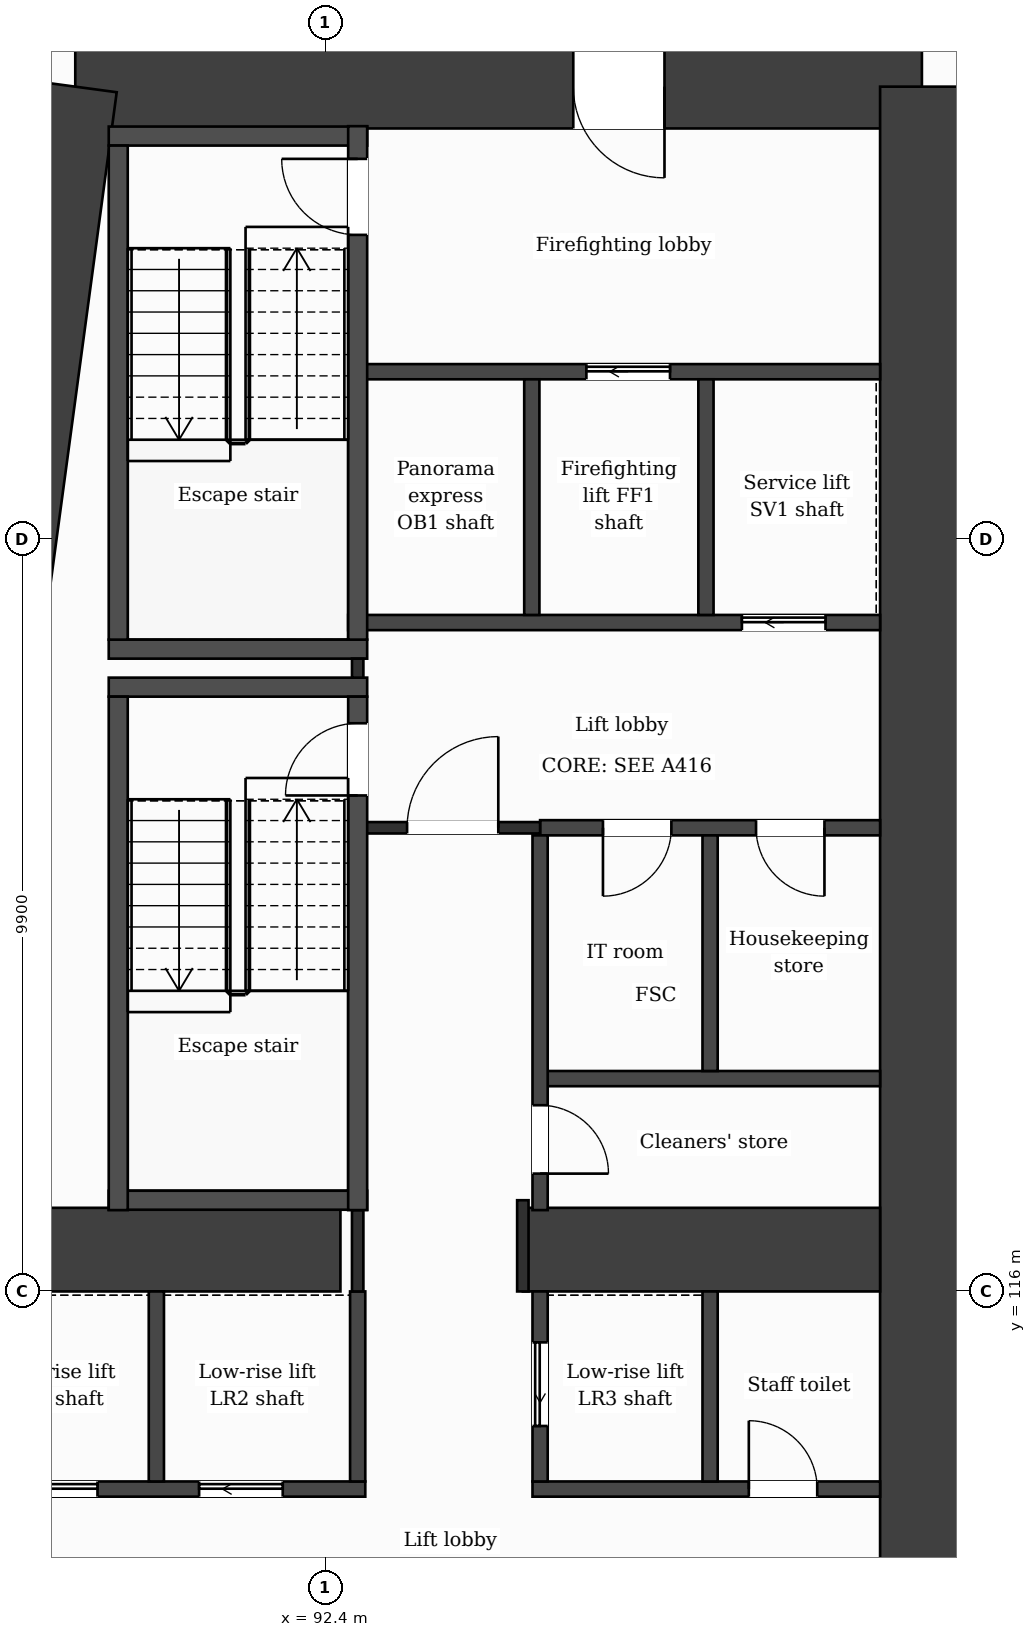
"""IFC4 building model, lengths in metres.
Left out: names, types, materials, properties, quantities, classifications, styles, units other than length and angle.
Written with IfcOpenShell. Run it as: python <this file> out.ifc"""

import sys

from ifc_helpers import new_model, si_unit, direction, frame, frame_2d, origin, place, context, subcontext, project, spatial, rectangle, extrude, element, fill, save


model = new_model("IFC4")
c1 = context("Model", 3, precision=1e-05, world=origin(), true_north=direction((0.0, 1.0)))
c2 = subcontext(c1, "Body", "Model", "MODEL_VIEW")
j1 = project(units=[si_unit("LENGTHUNIT", "METRE"), si_unit("PLANEANGLEUNIT", "RADIAN")], contexts=[c1])
p1 = place(None, origin())
s1 = spatial("IfcSite", under=j1, at=p1, CompositionType="ELEMENT")
p2 = place(p1, origin())
s2 = spatial("IfcBuilding", under=s1, at=p2, CompositionType="ELEMENT")
p3 = place(p2, frame((0.0, 0.0, 70.5)))
s3 = spatial("IfcBuildingStorey", under=s2, at=p3, CompositionType="ELEMENT", Elevation=70.5)
p4 = place(p3, frame((89.112, 131.85, 0.0), z_axis=(0.0, 0.0, 1.0), x_axis=(1.0, 0.0, 0.0)))
e1 = element("IfcWall", 1, at=p4, inside=s3, PredefinedType="SHEAR", context=c2, shape_type="SweptSolid", body=[
    extrude(rectangle(XDim=11.138, YDim=1.1, at=frame_2d((5.569, 0.0))), origin(), (0.0, 0.0, 1.0), 3.5),
])
p5 = place(p4, frame((6.552, 0.0, 0.0)))
e2 = element("IfcOpeningElement", 2, at=p5, cuts=e1, PredefinedType="OPENING", context=c2, shape_type="SweptSolid", body=[
    extrude(rectangle(XDim=1.2, YDim=2.1, at=frame_2d((0.6, 1.05))), frame((0.0, 0.56, 0.0), z_axis=(0.0, -1.0, 0.0), x_axis=(1.0, 0.0, 0.0)), (0.0, 0.0, 1.0), 1.12),
])
p6 = place(p3, frame((100.25, 131.85, 0.0), z_axis=(0.0, 0.0, 1.0), x_axis=(0.0, -1.0, 0.0)))
e3 = element("IfcWall", 3, at=p6, inside=s3, PredefinedType="SHEAR", context=c2, shape_type="SweptSolid", body=[
    extrude(rectangle(XDim=20.9, YDim=1.1, at=frame_2d((10.45, 0.0))), origin(), (0.0, 0.0, 1.0), 3.5),
])
p7 = place(p3, frame((86.298, 110.95, 0.0), z_axis=(0.0, 0.0, 1.0), x_axis=(0.133400422634, 0.99106222168, 0.0)))
e4 = element("IfcWall", 4, at=p7, inside=s3, PredefinedType="SHEAR", context=c2, shape_type="SweptSolid", body=[
    extrude(rectangle(XDim=21.089, YDim=1.1, at=frame_2d((10.544, 0.0))), origin(), (0.0, 0.0, 1.0), 3.5),
])
p8 = place(p3, frame((87.523, 116.55, 0.0), z_axis=(0.0, 0.0, 1.0), x_axis=(1.0, 0.0, 0.0)))
e5 = element("IfcWall", 5, at=p8, inside=s3, PredefinedType="SHEAR", context=c2, shape_type="SweptSolid", body=[
    extrude(rectangle(XDim=5.077, YDim=1.1, at=frame_2d((2.539, 0.0))), origin(), (0.0, 0.0, 1.0), 3.5),
])
p9 = place(p3, frame((95.0, 116.55, 0.0), z_axis=(0.0, 0.0, 1.0), x_axis=(1.0, 0.0, 0.0)))
e6 = element("IfcWall", 6, at=p9, inside=s3, PredefinedType="SHEAR", context=c2, shape_type="SweptSolid", body=[
    extrude(rectangle(XDim=4.7, YDim=1.1, at=frame_2d((2.35, 0.0))), origin(), (0.0, 0.0, 1.0), 3.5),
])
p10 = place(p3, frame((87.153, 113.4, 0.0), z_axis=(0.0, 0.0, 1.0), x_axis=(1.0, 0.0, 0.0)))
e7 = element("IfcWall", 7, at=p10, inside=s3, PredefinedType="PARTITIONING", context=c2, shape_type="SweptSolid", body=[
    extrude(rectangle(XDim=5.774, YDim=0.2, at=frame_2d((2.887, 0.0))), origin(), (0.0, 0.0, 1.0), 3.18),
])
p11 = place(p10, frame((1.151, 0.0, 0.0)))
e8 = element("IfcOpeningElement", 8, at=p11, cuts=e7, PredefinedType="OPENING", context=c2, shape_type="SweptSolid", body=[
    extrude(rectangle(XDim=1.1, YDim=2.1, at=frame_2d((0.55, 1.05))), frame((0.0, 0.11, 0.0), z_axis=(0.0, -1.0, 0.0), x_axis=(1.0, 0.0, 0.0)), (0.0, 0.0, 1.0), 0.22),
])
p12 = place(p10, frame((3.588, 0.0, 0.0)))
e9 = element("IfcOpeningElement", 9, at=p12, cuts=e7, PredefinedType="OPENING", context=c2, shape_type="SweptSolid", body=[
    extrude(rectangle(XDim=1.1, YDim=2.1, at=frame_2d((0.55, 1.05))), frame((0.0, 0.11, 0.0), z_axis=(0.0, -1.0, 0.0), x_axis=(1.0, 0.0, 0.0)), (0.0, 0.0, 1.0), 0.22),
])
p13 = place(p3, frame((95.127, 113.4, 0.0), z_axis=(0.0, 0.0, 1.0), x_axis=(1.0, 0.0, 0.0)))
e10 = element("IfcWall", 10, at=p13, inside=s3, PredefinedType="PARTITIONING", context=c2, shape_type="SweptSolid", body=[
    extrude(rectangle(XDim=4.573, YDim=0.2, at=frame_2d((2.287, 0.0))), origin(), (0.0, 0.0, 1.0), 3.18),
])
p14 = place(p13, frame((2.846, 0.0, 0.0)))
e11 = element("IfcOpeningElement", 11, at=p14, cuts=e10, PredefinedType="OPENING", context=c2, shape_type="SweptSolid", body=[
    extrude(rectangle(XDim=0.9, YDim=2.1, at=frame_2d((0.45, 1.05))), frame((0.0, 0.11, 0.0), z_axis=(0.0, -1.0, 0.0), x_axis=(1.0, 0.0, 0.0)), (0.0, 0.0, 1.0), 0.22),
])
p15 = place(p3, frame((89.552, 117.2, 0.0), z_axis=(0.0, 0.0, 1.0), x_axis=(1.0, 0.0, 0.0)))
e12 = element("IfcWall", 12, at=p15, inside=s3, PredefinedType="PARTITIONING", context=c2, shape_type="SweptSolid", body=[
    extrude(rectangle(XDim=3.4, YDim=0.25, at=frame_2d((1.7, 0.0))), origin(), (0.0, 0.0, 1.0), 3.18),
])
p16 = place(p3, frame((95.227, 118.8, 0.0), z_axis=(0.0, 0.0, 1.0), x_axis=(1.0, 0.0, 0.0)))
e13 = element("IfcWall", 13, at=p16, inside=s3, PredefinedType="PARTITIONING", context=c2, shape_type="SweptSolid", body=[
    extrude(rectangle(XDim=4.473, YDim=0.2, at=frame_2d((2.236, 0.0))), origin(), (0.0, 0.0, 1.0), 3.18),
])
p17 = place(p3, frame((95.227, 122.1, 0.0), z_axis=(0.0, 0.0, 1.0), x_axis=(1.0, 0.0, 0.0)))
e14 = element("IfcWall", 14, at=p17, inside=s3, PredefinedType="PARTITIONING", context=c2, shape_type="SweptSolid", body=[
    extrude(rectangle(XDim=4.473, YDim=0.2, at=frame_2d((2.236, 0.0))), origin(), (0.0, 0.0, 1.0), 3.18),
])
p18 = place(p17, frame((0.827, 0.0, 0.0)))
e15 = element("IfcOpeningElement", 15, at=p18, cuts=e14, PredefinedType="OPENING", context=c2, shape_type="SweptSolid", body=[
    extrude(rectangle(XDim=0.9, YDim=2.1, at=frame_2d((0.45, 1.05))), frame((0.0, 0.11, 0.0), z_axis=(0.0, -1.0, 0.0), x_axis=(1.0, 0.0, 0.0)), (0.0, 0.0, 1.0), 0.22),
])
p19 = place(p17, frame((2.841, 0.0, 0.0)))
e16 = element("IfcOpeningElement", 16, at=p19, cuts=e14, PredefinedType="OPENING", context=c2, shape_type="SweptSolid", body=[
    extrude(rectangle(XDim=0.9, YDim=2.1, at=frame_2d((0.45, 1.05))), frame((0.0, 0.11, 0.0), z_axis=(0.0, -1.0, 0.0), x_axis=(1.0, 0.0, 0.0)), (0.0, 0.0, 1.0), 0.22),
])
p20 = place(p3, frame((92.827, 122.1, 0.0), z_axis=(0.0, 0.0, 1.0), x_axis=(1.0, 0.0, 0.0)))
e17 = element("IfcWall", 17, at=p20, inside=s3, PredefinedType="PARTITIONING", context=c2, shape_type="SweptSolid", body=[
    extrude(rectangle(XDim=2.4, YDim=0.15, at=frame_2d((1.2, 0.0))), origin(), (0.0, 0.0, 1.0), 3.18),
])
p21 = place(p20, frame((0.65, 0.0, 0.0)))
e18 = element("IfcOpeningElement", 18, at=p21, cuts=e17, PredefinedType="OPENING", context=c2, shape_type="SweptSolid", body=[
    extrude(rectangle(XDim=1.2, YDim=2.1, at=frame_2d((0.6, 1.05))), frame((0.0, 0.085, 0.0), z_axis=(0.0, -1.0, 0.0), x_axis=(1.0, 0.0, 0.0)), (0.0, 0.0, 1.0), 0.17),
])
for number, where, z_axis, x_axis in (
    (19, (89.552, 123.95, 0.0), (0.0, 0.0, 1.0), (1.0, 0.0, 0.0)),
    (20, (89.552, 124.45, 0.0), (0.0, 0.0, 1.0), (1.0, 0.0, 0.0)),
):
    element("IfcWall", number, at=place(p3, frame(where, z_axis=z_axis, x_axis=x_axis)), inside=s3, PredefinedType="PARTITIONING", context=c2, shape_type="SweptSolid", body=[
        extrude(rectangle(XDim=3.4, YDim=0.25, at=frame_2d((1.7, 0.0))), origin(), (0.0, 0.0, 1.0), 3.18),
    ])
p22 = place(p3, frame((92.702, 124.8, 0.0), z_axis=(0.0, 0.0, 1.0), x_axis=(1.0, 0.0, 0.0)))
e21 = element("IfcWall", 21, at=p22, inside=s3, PredefinedType="PARTITIONING", context=c2, shape_type="SweptSolid", body=[
    extrude(rectangle(XDim=6.998, YDim=0.2, at=frame_2d((3.499, 0.0))), origin(), (0.0, 0.0, 1.0), 3.18),
])
p23 = place(p22, frame((5.18, 0.0, 0.0)))
e22 = element("IfcOpeningElement", 22, at=p23, cuts=e21, PredefinedType="OPENING", context=c2, shape_type="SweptSolid", body=[
    extrude(rectangle(XDim=1.1, YDim=2.1, at=frame_2d((0.55, 1.05))), frame((0.0, 0.11, 0.0), z_axis=(0.0, -1.0, 0.0), x_axis=(1.0, 0.0, 0.0)), (0.0, 0.0, 1.0), 0.22),
])
p24 = place(p3, frame((92.827, 128.1, 0.0), z_axis=(0.0, 0.0, 1.0), x_axis=(1.0, 0.0, 0.0)))
e23 = element("IfcWall", 23, at=p24, inside=s3, PredefinedType="PARTITIONING", context=c2, shape_type="SweptSolid", body=[
    extrude(rectangle(XDim=6.873, YDim=0.2, at=frame_2d((3.437, 0.0))), origin(), (0.0, 0.0, 1.0), 3.18),
])
p25 = place(p24, frame((3.009, 0.0, 0.0)))
e24 = element("IfcOpeningElement", 24, at=p25, cuts=e23, PredefinedType="OPENING", context=c2, shape_type="SweptSolid", body=[
    extrude(rectangle(XDim=1.1, YDim=2.1, at=frame_2d((0.55, 1.05))), frame((0.0, 0.11, 0.0), z_axis=(0.0, -1.0, 0.0), x_axis=(1.0, 0.0, 0.0)), (0.0, 0.0, 1.0), 0.22),
])
p26 = place(p3, frame((89.552, 131.2, 0.0), z_axis=(0.0, 0.0, 1.0), x_axis=(1.0, 0.0, 0.0)))
e25 = element("IfcWall", 25, at=p26, inside=s3, PredefinedType="PARTITIONING", context=c2, shape_type="SweptSolid", body=[
    extrude(rectangle(XDim=3.4, YDim=0.25, at=frame_2d((1.7, 0.0))), origin(), (0.0, 0.0, 1.0), 3.18),
])
p27 = place(p3, frame((89.677, 117.07, 0.0), z_axis=(0.0, 0.0, 1.0), x_axis=(0.0, 1.0, 0.0)))
e26 = element("IfcWall", 26, at=p27, inside=s3, PredefinedType="PARTITIONING", context=c2, shape_type="SweptSolid", body=[
    extrude(rectangle(XDim=6.755, YDim=0.25, at=frame_2d((3.377, 0.0))), origin(), (0.0, 0.0, 1.0), 3.18),
])
p28 = place(p3, frame((89.677, 124.575, 0.0), z_axis=(0.0, 0.0, 1.0), x_axis=(0.0, 1.0, 0.0)))
e27 = element("IfcWall", 27, at=p28, inside=s3, PredefinedType="PARTITIONING", context=c2, shape_type="SweptSolid", body=[
    extrude(rectangle(XDim=6.5, YDim=0.25, at=frame_2d((3.25, 0.0))), origin(), (0.0, 0.0, 1.0), 3.18),
])
for number, where, z_axis, x_axis in (
    (28, (90.178, 113.5, 0.0), (0.0, 0.0, 1.0), (0.0, 1.0, 0.0)),
    (29, (92.827, 113.5, 0.0), (0.0, 0.0, 1.0), (0.0, 1.0, 0.0)),
):
    element("IfcWall", number, at=place(p3, frame(where, z_axis=z_axis, x_axis=x_axis)), inside=s3, PredefinedType="PARTITIONING", context=c2, shape_type="SweptSolid", body=[
        extrude(rectangle(XDim=2.5, YDim=0.2, at=frame_2d((1.25, 0.0))), origin(), (0.0, 0.0, 1.0), 3.18),
    ])
p29 = place(p3, frame((92.827, 116.0, 0.0), z_axis=(0.0, 0.0, 1.0), x_axis=(0.0, 1.0, 0.0)))
e30 = element("IfcWall", 30, at=p29, inside=s3, PredefinedType="PARTITIONING", context=c2, shape_type="SweptSolid", body=[
    extrude(rectangle(XDim=1.07, YDim=0.15, at=frame_2d((0.535, 0.0))), origin(), (0.0, 0.0, 1.0), 3.18),
])
p30 = place(p3, frame((92.827, 124.075, 0.0), z_axis=(0.0, 0.0, 1.0), x_axis=(0.0, 1.0, 0.0)))
e31 = element("IfcWall", 31, at=p30, inside=s3, PredefinedType="PARTITIONING", context=c2, shape_type="SweptSolid", body=[
    extrude(rectangle(XDim=0.25, YDim=0.15, at=frame_2d((0.125, 0.0))), origin(), (0.0, 0.0, 1.0), 3.18),
])
p31 = place(p3, frame((92.827, 117.07, 0.0), z_axis=(0.0, 0.0, 1.0), x_axis=(0.0, 1.0, 0.0)))
e32 = element("IfcWall", 32, at=p31, inside=s3, PredefinedType="PARTITIONING", context=c2, shape_type="SweptSolid", body=[
    extrude(rectangle(XDim=6.755, YDim=0.25, at=frame_2d((3.377, 0.0))), origin(), (0.0, 0.0, 1.0), 3.18),
])
p32 = place(p31, frame((5.455, 0.0, 0.0)))
e33 = element("IfcOpeningElement", 33, at=p32, cuts=e32, PredefinedType="OPENING", context=c2, shape_type="SweptSolid", body=[
    extrude(rectangle(XDim=0.95, YDim=2.1, at=frame_2d((0.475, 1.05))), frame((0.0, 0.135, 0.0), z_axis=(0.0, -1.0, 0.0), x_axis=(1.0, 0.0, 0.0)), (0.0, 0.0, 1.0), 0.27),
])
p33 = place(p3, frame((92.827, 124.575, 0.0), z_axis=(0.0, 0.0, 1.0), x_axis=(0.0, 1.0, 0.0)))
e34 = element("IfcWall", 34, at=p33, inside=s3, PredefinedType="PARTITIONING", context=c2, shape_type="SweptSolid", body=[
    extrude(rectangle(XDim=6.755, YDim=0.25, at=frame_2d((3.377, 0.0))), origin(), (0.0, 0.0, 1.0), 3.18),
])
p34 = place(p33, frame((5.325, 0.0, 0.0)))
e35 = element("IfcOpeningElement", 35, at=p34, cuts=e34, PredefinedType="OPENING", context=c2, shape_type="SweptSolid", body=[
    extrude(rectangle(XDim=1.0, YDim=2.1, at=frame_2d((0.5, 1.05))), frame((0.0, 0.135, 0.0), z_axis=(0.0, -1.0, 0.0), x_axis=(1.0, 0.0, 0.0)), (0.0, 0.0, 1.0), 0.27),
])
p35 = place(p3, frame((95.0, 116.0, 0.0), z_axis=(0.0, 0.0, 1.0), x_axis=(0.0, 1.0, 0.0)))
e36 = element("IfcWall", 36, at=p35, inside=s3, PredefinedType="PARTITIONING", context=c2, shape_type="SweptSolid", body=[
    extrude(rectangle(XDim=1.2, YDim=0.15, at=frame_2d((0.6, 0.0))), origin(), (0.0, 0.0, 1.0), 3.18),
])
p36 = place(p3, frame((95.118, 124.9, 0.0), z_axis=(0.0, 0.0, 1.0), x_axis=(0.0, 1.0, 0.0)))
e37 = element("IfcWall", 37, at=p36, inside=s3, PredefinedType="PARTITIONING", context=c2, shape_type="SweptSolid", body=[
    extrude(rectangle(XDim=3.1, YDim=0.2, at=frame_2d((1.55, 0.0))), origin(), (0.0, 0.0, 1.0), 3.18),
])
p37 = place(p3, frame((95.227, 113.5, 0.0), z_axis=(0.0, 0.0, 1.0), x_axis=(0.0, 1.0, 0.0)))
e38 = element("IfcWall", 38, at=p37, inside=s3, PredefinedType="PARTITIONING", context=c2, shape_type="SweptSolid", body=[
    extrude(rectangle(XDim=2.5, YDim=0.2, at=frame_2d((1.25, 0.0))), origin(), (0.0, 0.0, 1.0), 3.18),
])
p38 = place(p37, frame((0.73, 0.0, 0.0)))
e39 = element("IfcOpeningElement", 39, at=p38, cuts=e38, PredefinedType="OPENING", context=c2, shape_type="SweptSolid", body=[
    extrude(rectangle(XDim=1.1, YDim=2.1, at=frame_2d((0.55, 1.05))), frame((0.0, 0.11, 0.0), z_axis=(0.0, -1.0, 0.0), x_axis=(1.0, 0.0, 0.0)), (0.0, 0.0, 1.0), 0.22),
])
p39 = place(p3, frame((95.227, 117.07, 0.0), z_axis=(0.0, 0.0, 1.0), x_axis=(0.0, 1.0, 0.0)))
e40 = element("IfcWall", 40, at=p39, inside=s3, PredefinedType="PARTITIONING", context=c2, shape_type="SweptSolid", body=[
    extrude(rectangle(XDim=4.93, YDim=0.2, at=frame_2d((2.465, 0.0))), origin(), (0.0, 0.0, 1.0), 3.18),
])
p40 = place(p39, frame((0.48, 0.0, 0.0)))
e41 = element("IfcOpeningElement", 41, at=p40, cuts=e40, PredefinedType="OPENING", context=c2, shape_type="SweptSolid", body=[
    extrude(rectangle(XDim=0.9, YDim=2.1, at=frame_2d((0.45, 1.05))), frame((0.0, 0.11, 0.0), z_axis=(0.0, -1.0, 0.0), x_axis=(1.0, 0.0, 0.0)), (0.0, 0.0, 1.0), 0.22),
])
p41 = place(p3, frame((97.409, 124.9, 0.0), z_axis=(0.0, 0.0, 1.0), x_axis=(0.0, 1.0, 0.0)))
e42 = element("IfcWall", 42, at=p41, inside=s3, PredefinedType="PARTITIONING", context=c2, shape_type="SweptSolid", body=[
    extrude(rectangle(XDim=3.1, YDim=0.2, at=frame_2d((1.55, 0.0))), origin(), (0.0, 0.0, 1.0), 3.18),
])
p42 = place(p3, frame((97.463, 113.5, 0.0), z_axis=(0.0, 0.0, 1.0), x_axis=(0.0, 1.0, 0.0)))
e43 = element("IfcWall", 43, at=p42, inside=s3, PredefinedType="PARTITIONING", context=c2, shape_type="SweptSolid", body=[
    extrude(rectangle(XDim=2.5, YDim=0.2, at=frame_2d((1.25, 0.0))), origin(), (0.0, 0.0, 1.0), 3.18),
])
p43 = place(p3, frame((97.463, 118.9, 0.0), z_axis=(0.0, 0.0, 1.0), x_axis=(0.0, 1.0, 0.0)))
e44 = element("IfcWall", 44, at=p43, inside=s3, PredefinedType="PARTITIONING", context=c2, shape_type="SweptSolid", body=[
    extrude(rectangle(XDim=3.1, YDim=0.2, at=frame_2d((1.55, 0.0))), origin(), (0.0, 0.0, 1.0), 3.18),
])
p44 = place(p21, origin())
e45 = element("IfcDoor", 45, at=p44, inside=s3, OperationType="SINGLE_SWING_RIGHT", PredefinedType="DOOR", context=c2, shape_type="SweptSolid", body=[
    extrude(rectangle(XDim=1.2, YDim=2.1, at=frame_2d((0.6, 1.05))), frame((0.0, 0.025, 0.0), z_axis=(0.0, -1.0, 0.0), x_axis=(1.0, 0.0, 0.0)), (0.0, 0.0, 1.0), 0.05),
])
fill(e18, e45)
p45 = place(p25, origin())
e46 = element("IfcDoor", 46, at=p45, inside=s3, OperationType="SLIDING_TO_LEFT", PredefinedType="DOOR", context=c2, shape_type="SweptSolid", body=[
    extrude(rectangle(XDim=1.1, YDim=2.1, at=frame_2d((0.55, 1.05))), frame((0.0, 0.025, 0.0), z_axis=(0.0, -1.0, 0.0), x_axis=(1.0, 0.0, 0.0)), (0.0, 0.0, 1.0), 0.05),
])
fill(e24, e46)
p46 = place(p23, origin())
e47 = element("IfcDoor", 47, at=p46, inside=s3, OperationType="SLIDING_TO_LEFT", PredefinedType="DOOR", context=c2, shape_type="SweptSolid", body=[
    extrude(rectangle(XDim=1.1, YDim=2.1, at=frame_2d((0.55, 1.05))), frame((0.0, 0.025, 0.0), z_axis=(0.0, -1.0, 0.0), x_axis=(1.0, 0.0, 0.0)), (0.0, 0.0, 1.0), 0.05),
])
fill(e22, e47)
p47 = place(p18, origin())
e48 = element("IfcDoor", 48, at=p47, inside=s3, OperationType="SINGLE_SWING_LEFT", PredefinedType="DOOR", context=c2, shape_type="SweptSolid", body=[
    extrude(rectangle(XDim=0.9, YDim=2.1, at=frame_2d((0.45, 1.05))), frame((0.0, 0.025, 0.0), z_axis=(0.0, -1.0, 0.0), x_axis=(1.0, 0.0, 0.0)), (0.0, 0.0, 1.0), 0.05),
])
fill(e15, e48)
p48 = place(p19, origin())
e49 = element("IfcDoor", 49, at=p48, inside=s3, OperationType="SINGLE_SWING_RIGHT", PredefinedType="DOOR", context=c2, shape_type="SweptSolid", body=[
    extrude(rectangle(XDim=0.9, YDim=2.1, at=frame_2d((0.45, 1.05))), frame((0.0, 0.025, 0.0), z_axis=(0.0, -1.0, 0.0), x_axis=(1.0, 0.0, 0.0)), (0.0, 0.0, 1.0), 0.05),
])
fill(e16, e49)
p49 = place(p32, origin())
e50 = element("IfcDoor", 50, at=p49, inside=s3, OperationType="SINGLE_SWING_LEFT", PredefinedType="DOOR", context=c2, shape_type="SweptSolid", body=[
    extrude(rectangle(XDim=0.95, YDim=2.1, at=frame_2d((0.475, 1.05))), frame((0.0, 0.025, 0.0), z_axis=(0.0, -1.0, 0.0), x_axis=(1.0, 0.0, 0.0)), (0.0, 0.0, 1.0), 0.05),
])
fill(e33, e50)
p50 = place(p34, origin())
e51 = element("IfcDoor", 51, at=p50, inside=s3, OperationType="SINGLE_SWING_RIGHT", PredefinedType="DOOR", context=c2, shape_type="SweptSolid", body=[
    extrude(rectangle(XDim=1.0, YDim=2.1, at=frame_2d((0.5, 1.05))), frame((0.0, 0.025, 0.0), z_axis=(0.0, -1.0, 0.0), x_axis=(1.0, 0.0, 0.0)), (0.0, 0.0, 1.0), 0.05),
])
fill(e35, e51)
p51 = place(p40, origin())
e52 = element("IfcDoor", 52, at=p51, inside=s3, OperationType="SINGLE_SWING_LEFT", PredefinedType="DOOR", context=c2, shape_type="SweptSolid", body=[
    extrude(rectangle(XDim=0.9, YDim=2.1, at=frame_2d((0.45, 1.05))), frame((0.0, 0.025, 0.0), z_axis=(0.0, -1.0, 0.0), x_axis=(1.0, 0.0, 0.0)), (0.0, 0.0, 1.0), 0.05),
])
fill(e41, e52)
p52 = place(p11, origin())
e53 = element("IfcDoor", 53, at=p52, inside=s3, OperationType="SLIDING_TO_LEFT", PredefinedType="DOOR", context=c2, shape_type="SweptSolid", body=[
    extrude(rectangle(XDim=1.1, YDim=2.1, at=frame_2d((0.55, 1.05))), frame((0.0, 0.025, 0.0), z_axis=(0.0, -1.0, 0.0), x_axis=(1.0, 0.0, 0.0)), (0.0, 0.0, 1.0), 0.05),
])
fill(e8, e53)
p53 = place(p12, origin())
e54 = element("IfcDoor", 54, at=p53, inside=s3, OperationType="SLIDING_TO_LEFT", PredefinedType="DOOR", context=c2, shape_type="SweptSolid", body=[
    extrude(rectangle(XDim=1.1, YDim=2.1, at=frame_2d((0.55, 1.05))), frame((0.0, 0.025, 0.0), z_axis=(0.0, -1.0, 0.0), x_axis=(1.0, 0.0, 0.0)), (0.0, 0.0, 1.0), 0.05),
])
fill(e9, e54)
p54 = place(p38, origin())
e55 = element("IfcDoor", 55, at=p54, inside=s3, OperationType="SLIDING_TO_LEFT", PredefinedType="DOOR", context=c2, shape_type="SweptSolid", body=[
    extrude(rectangle(XDim=1.1, YDim=2.1, at=frame_2d((0.55, 1.05))), frame((0.0, 0.025, 0.0), z_axis=(0.0, -1.0, 0.0), x_axis=(1.0, 0.0, 0.0)), (0.0, 0.0, 1.0), 0.05),
])
fill(e39, e55)
p55 = place(p14, origin())
e56 = element("IfcDoor", 56, at=p55, inside=s3, OperationType="SINGLE_SWING_LEFT", PredefinedType="DOOR", context=c2, shape_type="SweptSolid", body=[
    extrude(rectangle(XDim=0.9, YDim=2.1, at=frame_2d((0.45, 1.05))), frame((0.0, 0.025, 0.0), z_axis=(0.0, -1.0, 0.0), x_axis=(1.0, 0.0, 0.0)), (0.0, 0.0, 1.0), 0.05),
])
fill(e11, e56)
p56 = place(p5, origin())
e57 = element("IfcDoor", 57, at=p56, inside=s3, OperationType="SINGLE_SWING_RIGHT", PredefinedType="DOOR", context=c2, shape_type="SweptSolid", body=[
    extrude(rectangle(XDim=1.2, YDim=2.1, at=frame_2d((0.6, 1.05))), frame((0.0, 0.025, 0.0), z_axis=(0.0, -1.0, 0.0), x_axis=(1.0, 0.0, 0.0)), (0.0, 0.0, 1.0), 0.05),
])
fill(e2, e57)
save(model, sys.argv[1])
